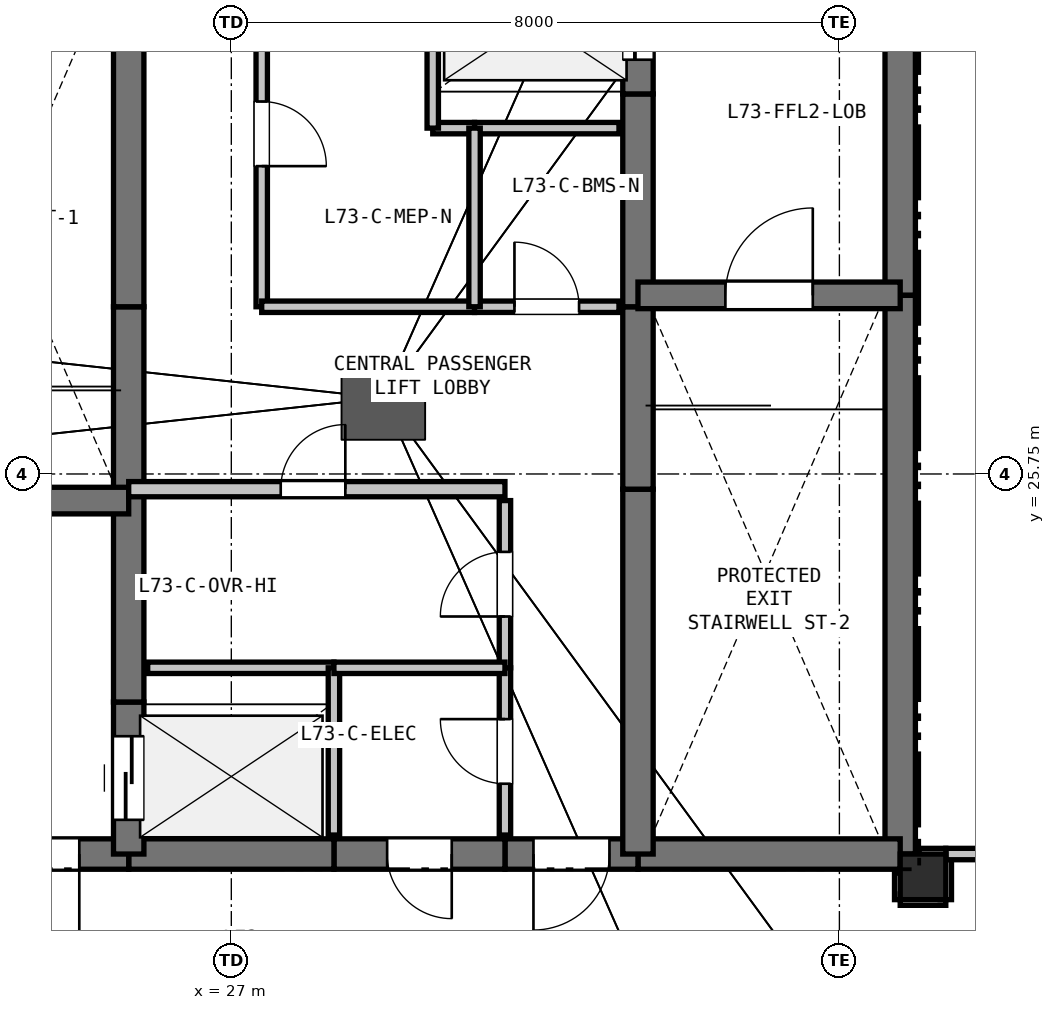
"""IFC4 building model, lengths in metres.
Left out: names, types, materials, properties, quantities, classifications, styles, units other than length and angle.
Written with IfcOpenShell. Run it as: python <this file> out.ifc"""

import sys

from ifc_helpers import new_model, si_unit, direction, frame, frame_2d, origin, origin_2d, place, context, subcontext, project, spatial, rectangle, extrude, element, fill, save


model = new_model("IFC4")
c1 = context("Model", 3, precision=1e-05, world=origin(), true_north=direction((0.0, 1.0)))
c2 = subcontext(c1, "Body", "Model", "MODEL_VIEW")
j1 = project(units=[si_unit("LENGTHUNIT", "METRE"), si_unit("PLANEANGLEUNIT", "RADIAN")], contexts=[c1])
p1 = place(None, origin())
s1 = spatial("IfcSite", under=j1, at=p1, CompositionType="ELEMENT")
p2 = place(p1, origin())
s2 = spatial("IfcBuilding", under=s1, at=p2, CompositionType="ELEMENT")
p3 = place(p2, frame((0.0, 0.0, 264.0)))
s3 = spatial("IfcBuildingStorey", under=s2, at=p3, CompositionType="ELEMENT", Elevation=264.0)
p4 = place(p3, frame((36.1, 20.45, 0.0), z_axis=(0.0, 0.0, 1.0), x_axis=(1.0, 0.0, 0.0)))
e1 = element("IfcColumn", 1, at=p4, inside=s3, PredefinedType="COLUMN", context=c2, shape_type="SweptSolid", body=[
    extrude(rectangle(XDim=0.6, YDim=0.6, at=origin_2d()), origin(), (0.0, 0.0, 1.0), 2.6),
])
p5 = place(p3, frame((10.732, 28.608, 0.0), z_axis=(0.0, 0.0, 1.0), x_axis=(0.866023553042, 0.500003205566, 0.0)))
e2 = element("IfcWall", 2, at=p5, inside=s3, PredefinedType="SOLIDWALL", context=c2, shape_type="SweptSolid", body=[
    extrude(rectangle(XDim=29.783, YDim=0.225, at=frame_2d((14.892, 0.0))), origin(), (0.0, 0.0, 1.0), 2.25),
])
p6 = place(p3, frame((10.602, 28.683, 2.7), z_axis=(0.0, 0.0, 1.0), x_axis=(0.866024093284, 0.500002269847, 0.0)))
e3 = element("IfcWall", 3, at=p6, inside=s3, PredefinedType="PARAPET", context=c2, shape_type="SweptSolid", body=[
    extrude(rectangle(XDim=29.933, YDim=0.175, at=frame_2d((14.967, 0.0))), origin(), (0.0, 0.0, 1.0), 1.2),
])
p7 = place(p3, frame((36.525, 10.0, 0.0), z_axis=(0.0, 0.0, 1.0), x_axis=(-0.866023553042, 0.500003205566, 0.0)))
e4 = element("IfcWall", 4, at=p7, inside=s3, PredefinedType="SOLIDWALL", context=c2, shape_type="SweptSolid", body=[
    extrude(rectangle(XDim=29.783, YDim=0.225, at=frame_2d((14.892, 0.0))), origin(), (0.0, 0.0, 1.0), 2.25),
])
p8 = place(p3, frame((36.525, 9.851, 2.7), z_axis=(0.0, 0.0, 1.0), x_axis=(-0.866024093284, 0.500002269847, 0.0)))
e5 = element("IfcWall", 5, at=p8, inside=s3, PredefinedType="PARAPET", context=c2, shape_type="SweptSolid", body=[
    extrude(rectangle(XDim=29.933, YDim=0.175, at=frame_2d((14.967, 0.0))), origin(), (0.0, 0.0, 1.0), 1.2),
])
p9 = place(p3, frame((35.8, 32.75, 0.0), z_axis=(0.0, 0.0, 1.0), x_axis=(0.0, -1.0, 0.0)))
e6 = element("IfcWall", 6, at=p9, inside=s3, PredefinedType="SHEAR", context=c2, shape_type="SweptSolid", body=[
    extrude(rectangle(XDim=4.65, YDim=0.4, at=frame_2d((2.325, 0.0))), origin(), (0.0, 0.0, 1.0), 2.6),
])
p10 = place(p3, frame((35.8, 28.1, 0.0), z_axis=(0.0, 0.0, 1.0), x_axis=(0.0, -1.0, 0.0)))
e7 = element("IfcWall", 7, at=p10, inside=s3, PredefinedType="SHEAR", context=c2, shape_type="SweptSolid", body=[
    extrude(rectangle(XDim=7.35, YDim=0.4, at=frame_2d((3.675, 0.0))), origin(), (0.0, 0.0, 1.0), 2.6),
])
p11 = place(p3, frame((35.8, 20.75, 0.0), z_axis=(0.0, 0.0, 1.0), x_axis=(-1.0, 0.0, 0.0)))
e8 = element("IfcWall", 8, at=p11, inside=s3, PredefinedType="SHEAR", context=c2, shape_type="SweptSolid", body=[
    extrude(rectangle(XDim=3.45, YDim=0.4, at=frame_2d((1.725, 0.0))), origin(), (0.0, 0.0, 1.0), 2.6),
])
p12 = place(p3, frame((32.35, 20.75, 0.0), z_axis=(0.0, 0.0, 1.0), x_axis=(-1.0, 0.0, 0.0)))
e9 = element("IfcWall", 9, at=p12, inside=s3, PredefinedType="SHEAR", context=c2, shape_type="SweptSolid", body=[
    extrude(rectangle(XDim=1.75, YDim=0.4, at=frame_2d((0.875, 0.0))), origin(), (0.0, 0.0, 1.0), 2.6),
])
p13 = place(p12, frame((0.375, 0.0, 0.0)))
e10 = element("IfcOpeningElement", 10, at=p13, cuts=e9, PredefinedType="OPENING", context=c2, shape_type="SweptSolid", body=[
    extrude(rectangle(XDim=1.0, YDim=2.15, at=frame_2d((0.5, 1.075))), frame((0.0, 0.21, 0.0), z_axis=(0.0, -1.0, 0.0), x_axis=(1.0, 0.0, 0.0)), (0.0, 0.0, 1.0), 0.42),
])
p14 = place(p3, frame((30.6, 20.75, 0.0), z_axis=(0.0, 0.0, 1.0), x_axis=(-1.0, 0.0, 0.0)))
e11 = element("IfcWall", 11, at=p14, inside=s3, PredefinedType="SHEAR", context=c2, shape_type="SweptSolid", body=[
    extrude(rectangle(XDim=2.25, YDim=0.4, at=frame_2d((1.125, 0.0))), origin(), (0.0, 0.0, 1.0), 2.6),
])
p15 = place(p14, frame((0.7, 0.0, 0.0)))
e12 = element("IfcOpeningElement", 12, at=p15, cuts=e11, PredefinedType="OPENING", context=c2, shape_type="SweptSolid", body=[
    extrude(rectangle(XDim=0.85, YDim=2.1, at=frame_2d((0.425, 1.05))), frame((0.0, 0.21, 0.0), z_axis=(0.0, -1.0, 0.0), x_axis=(1.0, 0.0, 0.0)), (0.0, 0.0, 1.0), 0.42),
])
p16 = place(p3, frame((28.35, 20.75, 0.0), z_axis=(0.0, 0.0, 1.0), x_axis=(-1.0, 0.0, 0.0)))
e13 = element("IfcWall", 13, at=p16, inside=s3, PredefinedType="SHEAR", context=c2, shape_type="SweptSolid", body=[
    extrude(rectangle(XDim=2.7, YDim=0.4, at=frame_2d((1.35, 0.0))), origin(), (0.0, 0.0, 1.0), 2.6),
])
p17 = place(p3, frame((25.65, 20.75, 0.0), z_axis=(0.0, 0.0, 1.0), x_axis=(-1.0, 0.0, 0.0)))
e14 = element("IfcWall", 14, at=p17, inside=s3, PredefinedType="SHEAR", context=c2, shape_type="SweptSolid", body=[
    extrude(rectangle(XDim=3.45, YDim=0.4, at=frame_2d((1.725, 0.0))), origin(), (0.0, 0.0, 1.0), 2.6),
])
p18 = place(p17, frame((0.65, 0.0, 0.0)))
e15 = element("IfcOpeningElement", 15, at=p18, cuts=e14, PredefinedType="OPENING", context=c2, shape_type="SweptSolid", body=[
    extrude(rectangle(XDim=1.15, YDim=2.15, at=frame_2d((0.575, 1.075))), frame((0.0, 0.21, 0.0), z_axis=(0.0, -1.0, 0.0), x_axis=(1.0, 0.0, 0.0)), (0.0, 0.0, 1.0), 0.42),
])
p19 = place(p3, frame((25.65, 20.75, 0.0), z_axis=(0.0, 0.0, 1.0), x_axis=(0.0, 1.0, 0.0)))
e16 = element("IfcWall", 16, at=p19, inside=s3, PredefinedType="SHEAR", context=c2, shape_type="SweptSolid", body=[
    extrude(rectangle(XDim=2.0, YDim=0.4, at=frame_2d((1.0, 0.0))), origin(), (0.0, 0.0, 1.0), 2.6),
])
p20 = place(p19, frame((0.45, 0.0, 0.0)))
e17 = element("IfcOpeningElement", 17, at=p20, cuts=e16, PredefinedType="OPENING", context=c2, shape_type="SweptSolid", body=[
    extrude(rectangle(XDim=1.1, YDim=2.15, at=frame_2d((0.55, 1.075))), frame((0.0, 0.21, 0.0), z_axis=(0.0, -1.0, 0.0), x_axis=(1.0, 0.0, 0.0)), (0.0, 0.0, 1.0), 0.42),
])
p21 = place(p3, frame((25.65, 22.75, 0.0), z_axis=(0.0, 0.0, 1.0), x_axis=(0.0, 1.0, 0.0)))
e18 = element("IfcWall", 18, at=p21, inside=s3, PredefinedType="SHEAR", context=c2, shape_type="SweptSolid", body=[
    extrude(rectangle(XDim=2.8, YDim=0.4, at=frame_2d((1.4, 0.0))), origin(), (0.0, 0.0, 1.0), 2.6),
])
p22 = place(p3, frame((25.65, 25.55, 0.0), z_axis=(0.0, 0.0, 1.0), x_axis=(0.0, 1.0, 0.0)))
e19 = element("IfcWall", 19, at=p22, inside=s3, PredefinedType="SHEAR", context=c2, shape_type="SweptSolid", body=[
    extrude(rectangle(XDim=2.4, YDim=0.4, at=frame_2d((1.2, 0.0))), origin(), (0.0, 0.0, 1.0), 2.6),
])
for number, where, z_axis, x_axis in (
    (20, (25.65, 27.95, 0.0), (0.0, 0.0, 1.0), (0.0, 1.0, 0.0)),
    (21, (32.35, 20.75, 0.0), (0.0, 0.0, 1.0), (0.0, 1.0, 0.0)),
):
    element("IfcWall", number, at=place(p3, frame(where, z_axis=z_axis, x_axis=x_axis)), inside=s3, PredefinedType="SHEAR", context=c2, shape_type="SweptSolid", body=[
        extrude(rectangle(XDim=4.8, YDim=0.4, at=frame_2d((2.4, 0.0))), origin(), (0.0, 0.0, 1.0), 2.6),
    ])
p23 = place(p3, frame((32.35, 25.55, 0.0), z_axis=(0.0, 0.0, 1.0), x_axis=(0.0, 1.0, 0.0)))
e22 = element("IfcWall", 22, at=p23, inside=s3, PredefinedType="SHEAR", context=c2, shape_type="SweptSolid", body=[
    extrude(rectangle(XDim=2.4, YDim=0.4, at=frame_2d((1.2, 0.0))), origin(), (0.0, 0.0, 1.0), 2.6),
])
p24 = place(p3, frame((32.35, 27.95, 0.0), z_axis=(0.0, 0.0, 1.0), x_axis=(0.0, 1.0, 0.0)))
e23 = element("IfcWall", 23, at=p24, inside=s3, PredefinedType="SHEAR", context=c2, shape_type="SweptSolid", body=[
    extrude(rectangle(XDim=2.8, YDim=0.4, at=frame_2d((1.4, 0.0))), origin(), (0.0, 0.0, 1.0), 2.6),
])
p25 = place(p3, frame((32.35, 30.75, 0.0), z_axis=(0.0, 0.0, 1.0), x_axis=(0.0, 1.0, 0.0)))
e24 = element("IfcWall", 24, at=p25, inside=s3, PredefinedType="SHEAR", context=c2, shape_type="SweptSolid", body=[
    extrude(rectangle(XDim=2.0, YDim=0.4, at=frame_2d((1.0, 0.0))), origin(), (0.0, 0.0, 1.0), 2.6),
])
p26 = place(p25, frame((0.45, 0.0, 0.0)))
e25 = element("IfcOpeningElement", 25, at=p26, cuts=e24, PredefinedType="OPENING", context=c2, shape_type="SweptSolid", body=[
    extrude(rectangle(XDim=1.1, YDim=2.15, at=frame_2d((0.55, 1.075))), frame((0.0, 0.21, 0.0), z_axis=(0.0, -1.0, 0.0), x_axis=(1.0, 0.0, 0.0)), (0.0, 0.0, 1.0), 0.42),
])
p27 = place(p3, frame((22.2, 25.4, 0.0), z_axis=(0.0, 0.0, 1.0), x_axis=(1.0, 0.0, 0.0)))
e26 = element("IfcWall", 26, at=p27, inside=s3, PredefinedType="SHEAR", context=c2, shape_type="SweptSolid", body=[
    extrude(rectangle(XDim=3.45, YDim=0.35, at=frame_2d((1.725, 0.0))), origin(), (0.0, 0.0, 1.0), 2.6),
])
p28 = place(p27, frame((1.15, 0.0, 0.0)))
e27 = element("IfcOpeningElement", 27, at=p28, cuts=e26, PredefinedType="OPENING", context=c2, shape_type="SweptSolid", body=[
    extrude(rectangle(XDim=1.15, YDim=2.15, at=frame_2d((0.575, 1.075))), frame((0.0, 0.185, 0.0), z_axis=(0.0, -1.0, 0.0), x_axis=(1.0, 0.0, 0.0)), (0.0, 0.0, 1.0), 0.37),
])
p29 = place(p3, frame((32.35, 28.1, 0.0), z_axis=(0.0, 0.0, 1.0), x_axis=(1.0, 0.0, 0.0)))
e28 = element("IfcWall", 28, at=p29, inside=s3, PredefinedType="SHEAR", context=c2, shape_type="SweptSolid", body=[
    extrude(rectangle(XDim=3.45, YDim=0.35, at=frame_2d((1.725, 0.0))), origin(), (0.0, 0.0, 1.0), 2.6),
])
p30 = place(p29, frame((1.15, 0.0, 0.0)))
e29 = element("IfcOpeningElement", 29, at=p30, cuts=e28, PredefinedType="OPENING", context=c2, shape_type="SweptSolid", body=[
    extrude(rectangle(XDim=1.15, YDim=2.15, at=frame_2d((0.575, 1.075))), frame((0.0, 0.185, 0.0), z_axis=(0.0, -1.0, 0.0), x_axis=(1.0, 0.0, 0.0)), (0.0, 0.0, 1.0), 0.37),
])
p31 = place(p3, frame((25.65, 25.55, 0.0), z_axis=(0.0, 0.0, 1.0), x_axis=(1.0, 0.0, 0.0)))
e30 = element("IfcWall", 30, at=p31, inside=s3, PredefinedType="PARTITIONING", context=c2, shape_type="SweptSolid", body=[
    extrude(rectangle(XDim=4.95, YDim=0.2, at=frame_2d((2.475, 0.0))), origin(), (0.0, 0.0, 1.0), 2.6),
])
p32 = place(p31, frame((2.0, 0.0, 0.0)))
e31 = element("IfcOpeningElement", 31, at=p32, cuts=e30, PredefinedType="OPENING", context=c2, shape_type="SweptSolid", body=[
    extrude(rectangle(XDim=0.85, YDim=2.1, at=frame_2d((0.425, 1.05))), frame((0.0, 0.11, 0.0), z_axis=(0.0, -1.0, 0.0), x_axis=(1.0, 0.0, 0.0)), (0.0, 0.0, 1.0), 0.22),
])
p33 = place(p3, frame((25.9, 23.2, 0.0), z_axis=(0.0, 0.0, 1.0), x_axis=(1.0, 0.0, 0.0)))
e32 = element("IfcWall", 32, at=p33, inside=s3, PredefinedType="PARTITIONING", context=c2, shape_type="SweptSolid", body=[
    extrude(rectangle(XDim=2.45, YDim=0.15, at=frame_2d((1.225, 0.0))), origin(), (0.0, 0.0, 1.0), 2.6),
])
p34 = place(p3, frame((28.35, 23.2, 0.0), z_axis=(0.0, 0.0, 1.0), x_axis=(0.0, -1.0, 0.0)))
e33 = element("IfcWall", 33, at=p34, inside=s3, PredefinedType="PARTITIONING", context=c2, shape_type="SweptSolid", body=[
    extrude(rectangle(XDim=2.2, YDim=0.15, at=frame_2d((1.1, 0.0))), origin(), (0.0, 0.0, 1.0), 2.6),
])
p35 = place(p3, frame((32.1, 30.3, 0.0), z_axis=(0.0, 0.0, 1.0), x_axis=(-1.0, 0.0, 0.0)))
e34 = element("IfcWall", 34, at=p35, inside=s3, PredefinedType="PARTITIONING", context=c2, shape_type="SweptSolid", body=[
    extrude(rectangle(XDim=1.9, YDim=0.15, at=frame_2d((0.95, 0.0))), origin(), (0.0, 0.0, 1.0), 2.6),
])
p36 = place(p3, frame((30.2, 30.3, 0.0), z_axis=(0.0, 0.0, 1.0), x_axis=(-1.0, 0.0, 0.0)))
e35 = element("IfcWall", 35, at=p36, inside=s3, PredefinedType="PARTITIONING", context=c2, shape_type="SweptSolid", body=[
    extrude(rectangle(XDim=0.55, YDim=0.15, at=frame_2d((0.275, 0.0))), origin(), (0.0, 0.0, 1.0), 2.6),
])
p37 = place(p3, frame((29.65, 30.3, 0.0), z_axis=(0.0, 0.0, 1.0), x_axis=(0.0, 1.0, 0.0)))
e36 = element("IfcWall", 36, at=p37, inside=s3, PredefinedType="PARTITIONING", context=c2, shape_type="SweptSolid", body=[
    extrude(rectangle(XDim=2.2, YDim=0.15, at=frame_2d((1.1, 0.0))), origin(), (0.0, 0.0, 1.0), 2.6),
])
p38 = place(p3, frame((30.6, 21.0, 0.0), z_axis=(0.0, 0.0, 1.0), x_axis=(0.0, 1.0, 0.0)))
e37 = element("IfcWall", 37, at=p38, inside=s3, PredefinedType="PARTITIONING", context=c2, shape_type="SweptSolid", body=[
    extrude(rectangle(XDim=2.2, YDim=0.15, at=frame_2d((1.1, 0.0))), origin(), (0.0, 0.0, 1.0), 2.6),
])
p39 = place(p38, frame((0.675, 0.0, 0.0)))
e38 = element("IfcOpeningElement", 38, at=p39, cuts=e37, PredefinedType="OPENING", context=c2, shape_type="SweptSolid", body=[
    extrude(rectangle(XDim=0.85, YDim=2.1, at=frame_2d((0.425, 1.05))), frame((0.0, 0.085, 0.0), z_axis=(0.0, -1.0, 0.0), x_axis=(1.0, 0.0, 0.0)), (0.0, 0.0, 1.0), 0.17),
])
p40 = place(p3, frame((30.6, 23.2, 0.0), z_axis=(0.0, 0.0, 1.0), x_axis=(0.0, 1.0, 0.0)))
e39 = element("IfcWall", 39, at=p40, inside=s3, PredefinedType="PARTITIONING", context=c2, shape_type="SweptSolid", body=[
    extrude(rectangle(XDim=2.2, YDim=0.15, at=frame_2d((1.1, 0.0))), origin(), (0.0, 0.0, 1.0), 2.6),
])
p41 = place(p40, frame((0.675, 0.0, 0.0)))
e40 = element("IfcOpeningElement", 40, at=p41, cuts=e39, PredefinedType="OPENING", context=c2, shape_type="SweptSolid", body=[
    extrude(rectangle(XDim=0.85, YDim=2.1, at=frame_2d((0.425, 1.05))), frame((0.0, 0.085, 0.0), z_axis=(0.0, -1.0, 0.0), x_axis=(1.0, 0.0, 0.0)), (0.0, 0.0, 1.0), 0.17),
])
p42 = place(p3, frame((27.4, 32.5, 0.0), z_axis=(0.0, 0.0, 1.0), x_axis=(0.0, -1.0, 0.0)))
e41 = element("IfcWall", 41, at=p42, inside=s3, PredefinedType="PARTITIONING", context=c2, shape_type="SweptSolid", body=[
    extrude(rectangle(XDim=4.55, YDim=0.15, at=frame_2d((2.275, 0.0))), origin(), (0.0, 0.0, 1.0), 2.6),
])
p43 = place(p42, frame((1.85, 0.0, 0.0)))
e42 = element("IfcOpeningElement", 42, at=p43, cuts=e41, PredefinedType="OPENING", context=c2, shape_type="SweptSolid", body=[
    extrude(rectangle(XDim=0.85, YDim=2.1, at=frame_2d((0.425, 1.05))), frame((0.0, 0.085, 0.0), z_axis=(0.0, -1.0, 0.0), x_axis=(1.0, 0.0, 0.0)), (0.0, 0.0, 1.0), 0.17),
])
p44 = place(p3, frame((27.4, 27.95, 0.0), z_axis=(0.0, 0.0, 1.0), x_axis=(1.0, 0.0, 0.0)))
e43 = element("IfcWall", 43, at=p44, inside=s3, PredefinedType="PARTITIONING", context=c2, shape_type="SweptSolid", body=[
    extrude(rectangle(XDim=2.8, YDim=0.15, at=frame_2d((1.4, 0.0))), origin(), (0.0, 0.0, 1.0), 2.6),
])
p45 = place(p3, frame((30.2, 27.95, 0.0), z_axis=(0.0, 0.0, 1.0), x_axis=(1.0, 0.0, 0.0)))
e44 = element("IfcWall", 44, at=p45, inside=s3, PredefinedType="PARTITIONING", context=c2, shape_type="SweptSolid", body=[
    extrude(rectangle(XDim=1.9, YDim=0.15, at=frame_2d((0.95, 0.0))), origin(), (0.0, 0.0, 1.0), 2.6),
])
p46 = place(p45, frame((0.525, 0.0, 0.0)))
e45 = element("IfcOpeningElement", 45, at=p46, cuts=e44, PredefinedType="OPENING", context=c2, shape_type="SweptSolid", body=[
    extrude(rectangle(XDim=0.85, YDim=2.1, at=frame_2d((0.425, 1.05))), frame((0.0, 0.085, 0.0), z_axis=(0.0, -1.0, 0.0), x_axis=(1.0, 0.0, 0.0)), (0.0, 0.0, 1.0), 0.17),
])
p47 = place(p3, frame((35.8, 20.5, 0.0), z_axis=(0.0, 0.0, 1.0), x_axis=(0.0, -1.0, 0.0)))
e46 = element("IfcWall", 46, at=p47, inside=s3, PredefinedType="PARTITIONING", context=c2, shape_type="SweptSolid", body=[
    extrude(rectangle(XDim=0.35, YDim=0.15, at=frame_2d((0.175, 0.0))), origin(), (0.0, 0.0, 1.0), 2.6),
])
p48 = place(p3, frame((35.8, 20.15, 0.0), z_axis=(0.0, 0.0, 1.0), x_axis=(1.0, 0.0, 0.0)))
e47 = element("IfcWall", 47, at=p48, inside=s3, PredefinedType="PARTITIONING", context=c2, shape_type="SweptSolid", body=[
    extrude(rectangle(XDim=0.6, YDim=0.15, at=frame_2d((0.3, 0.0))), origin(), (0.0, 0.0, 1.0), 2.6),
])
p49 = place(p3, frame((36.4, 20.15, 0.0), z_axis=(0.0, 0.0, 1.0), x_axis=(0.0, 1.0, 0.0)))
e48 = element("IfcWall", 48, at=p49, inside=s3, PredefinedType="PARTITIONING", context=c2, shape_type="SweptSolid", body=[
    extrude(rectangle(XDim=0.6, YDim=0.15, at=frame_2d((0.3, 0.0))), origin(), (0.0, 0.0, 1.0), 2.6),
])
p50 = place(p3, frame((36.4, 20.75, 0.0), z_axis=(0.0, 0.0, 1.0), x_axis=(1.0, 0.0, 0.0)))
e49 = element("IfcWall", 49, at=p50, inside=s3, PredefinedType="PARTITIONING", context=c2, shape_type="SweptSolid", body=[
    extrude(rectangle(XDim=1.45, YDim=0.15, at=frame_2d((0.725, 0.0))), origin(), (0.0, 0.0, 1.0), 2.6),
])
p51 = place(p3, frame((30.6, 23.2, 0.0), z_axis=(0.0, 0.0, 1.0), x_axis=(-1.0, 0.0, 0.0)))
e50 = element("IfcWall", 50, at=p51, inside=s3, PredefinedType="PARTITIONING", context=c2, shape_type="SweptSolid", body=[
    extrude(rectangle(XDim=2.25, YDim=0.15, at=frame_2d((1.125, 0.0))), origin(), (0.0, 0.0, 1.0), 2.6),
])
p52 = place(p3, frame((30.2, 30.3, 0.0), z_axis=(0.0, 0.0, 1.0), x_axis=(0.0, -1.0, 0.0)))
e51 = element("IfcWall", 51, at=p52, inside=s3, PredefinedType="PARTITIONING", context=c2, shape_type="SweptSolid", body=[
    extrude(rectangle(XDim=2.35, YDim=0.15, at=frame_2d((1.175, 0.0))), origin(), (0.0, 0.0, 1.0), 2.6),
])
p53 = place(p3, frame((36.4, 20.75, 0.0), z_axis=(0.0, 0.0, 1.0), x_axis=(-1.0, 0.0, 0.0)))
e52 = element("IfcWall", 52, at=p53, inside=s3, PredefinedType="PARTITIONING", context=c2, shape_type="SweptSolid", body=[
    extrude(rectangle(XDim=0.35, YDim=0.15, at=frame_2d((0.175, 0.0))), origin(), (0.0, 0.0, 1.0), 2.6),
])
p54 = place(p32, origin())
e53 = element("IfcDoor", 53, at=p54, inside=s3, OperationType="SINGLE_SWING_RIGHT", PredefinedType="DOOR", context=c2, shape_type="SweptSolid", body=[
    extrude(rectangle(XDim=0.85, YDim=2.1, at=frame_2d((0.425, 1.05))), frame((0.0, 0.025, 0.0), z_axis=(0.0, -1.0, 0.0), x_axis=(1.0, 0.0, 0.0)), (0.0, 0.0, 1.0), 0.05),
])
fill(e31, e53)
p55 = place(p13, origin())
e54 = element("IfcDoor", 54, at=p55, inside=s3, OperationType="SINGLE_SWING_RIGHT", PredefinedType="DOOR", context=c2, shape_type="SweptSolid", body=[
    extrude(rectangle(XDim=1.0, YDim=2.15, at=frame_2d((0.5, 1.075))), frame((0.0, 0.025, 0.0), z_axis=(0.0, -1.0, 0.0), x_axis=(1.0, 0.0, 0.0)), (0.0, 0.0, 1.0), 0.05),
])
fill(e10, e54)
p56 = place(p20, origin())
e55 = element("IfcDoor", 55, at=p56, inside=s3, OperationType="SLIDING_TO_LEFT", PredefinedType="DOOR", context=c2, shape_type="SweptSolid", body=[
    extrude(rectangle(XDim=1.1, YDim=2.15, at=frame_2d((0.55, 1.075))), frame((0.0, 0.025, 0.0), z_axis=(0.0, -1.0, 0.0), x_axis=(1.0, 0.0, 0.0)), (0.0, 0.0, 1.0), 0.05),
])
fill(e17, e55)
p57 = place(p26, origin())
e56 = element("IfcDoor", 56, at=p57, inside=s3, OperationType="SLIDING_TO_LEFT", PredefinedType="DOOR", context=c2, shape_type="SweptSolid", body=[
    extrude(rectangle(XDim=1.1, YDim=2.15, at=frame_2d((0.55, 1.075))), frame((0.0, 0.025, 0.0), z_axis=(0.0, -1.0, 0.0), x_axis=(1.0, 0.0, 0.0)), (0.0, 0.0, 1.0), 0.05),
])
fill(e25, e56)
p58 = place(p30, origin())
e57 = element("IfcDoor", 57, at=p58, inside=s3, OperationType="SINGLE_SWING_RIGHT", PredefinedType="DOOR", context=c2, shape_type="SweptSolid", body=[
    extrude(rectangle(XDim=1.15, YDim=2.15, at=frame_2d((0.575, 1.075))), frame((0.0, 0.025, 0.0), z_axis=(0.0, -1.0, 0.0), x_axis=(1.0, 0.0, 0.0)), (0.0, 0.0, 1.0), 0.05),
])
fill(e29, e57)
p59 = place(p18, origin())
e58 = element("IfcDoor", 58, at=p59, inside=s3, OperationType="SINGLE_SWING_LEFT", PredefinedType="DOOR", context=c2, shape_type="SweptSolid", body=[
    extrude(rectangle(XDim=1.15, YDim=2.15, at=frame_2d((0.575, 1.075))), frame((0.0, 0.025, 0.0), z_axis=(0.0, -1.0, 0.0), x_axis=(1.0, 0.0, 0.0)), (0.0, 0.0, 1.0), 0.05),
])
fill(e15, e58)
p60 = place(p41, origin())
e59 = element("IfcDoor", 59, at=p60, inside=s3, OperationType="SINGLE_SWING_LEFT", PredefinedType="DOOR", context=c2, shape_type="SweptSolid", body=[
    extrude(rectangle(XDim=0.85, YDim=2.1, at=frame_2d((0.425, 1.05))), frame((0.0, 0.025, 0.0), z_axis=(0.0, -1.0, 0.0), x_axis=(1.0, 0.0, 0.0)), (0.0, 0.0, 1.0), 0.05),
])
fill(e40, e59)
p61 = place(p43, origin())
e60 = element("IfcDoor", 60, at=p61, inside=s3, OperationType="SINGLE_SWING_RIGHT", PredefinedType="DOOR", context=c2, shape_type="SweptSolid", body=[
    extrude(rectangle(XDim=0.85, YDim=2.1, at=frame_2d((0.425, 1.05))), frame((0.0, 0.025, 0.0), z_axis=(0.0, -1.0, 0.0), x_axis=(1.0, 0.0, 0.0)), (0.0, 0.0, 1.0), 0.05),
])
fill(e42, e60)
p62 = place(p46, origin())
e61 = element("IfcDoor", 61, at=p62, inside=s3, OperationType="SINGLE_SWING_LEFT", PredefinedType="DOOR", context=c2, shape_type="SweptSolid", body=[
    extrude(rectangle(XDim=0.85, YDim=2.1, at=frame_2d((0.425, 1.05))), frame((0.0, 0.025, 0.0), z_axis=(0.0, -1.0, 0.0), x_axis=(1.0, 0.0, 0.0)), (0.0, 0.0, 1.0), 0.05),
])
fill(e45, e61)
p63 = place(p39, origin())
e62 = element("IfcDoor", 62, at=p63, inside=s3, OperationType="SINGLE_SWING_RIGHT", PredefinedType="DOOR", context=c2, shape_type="SweptSolid", body=[
    extrude(rectangle(XDim=0.85, YDim=2.1, at=frame_2d((0.425, 1.05))), frame((0.0, 0.025, 0.0), z_axis=(0.0, -1.0, 0.0), x_axis=(1.0, 0.0, 0.0)), (0.0, 0.0, 1.0), 0.05),
])
fill(e38, e62)
p64 = place(p15, origin())
e63 = element("IfcDoor", 63, at=p64, inside=s3, OperationType="SINGLE_SWING_LEFT", PredefinedType="DOOR", context=c2, shape_type="SweptSolid", body=[
    extrude(rectangle(XDim=0.85, YDim=2.1, at=frame_2d((0.425, 1.05))), frame((0.0, 0.025, 0.0), z_axis=(0.0, -1.0, 0.0), x_axis=(1.0, 0.0, 0.0)), (0.0, 0.0, 1.0), 0.05),
])
fill(e12, e63)
save(model, sys.argv[1])
